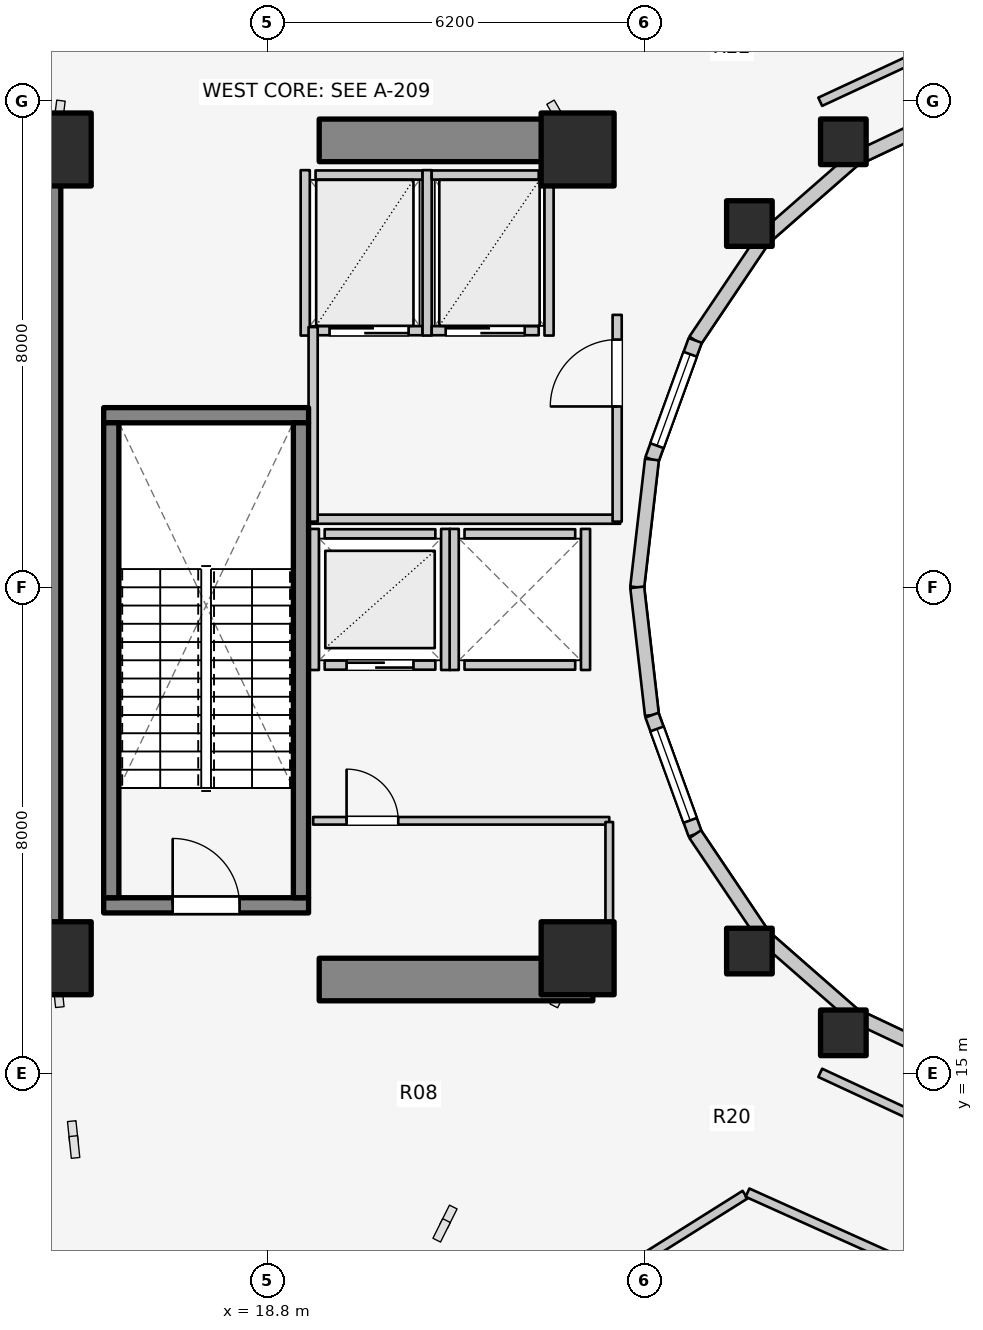
"""IFC4 building model, lengths in metres.
Left out: names, types, materials, properties, quantities, classifications, styles, units other than length and angle.
Written with IfcOpenShell. Run it as: python <this file> out.ifc"""

import sys

from ifc_helpers import new_model, si_unit, direction, frame, frame_2d, origin, origin_2d, place, context, subcontext, project, spatial, rectangle, extrude, element, fill, save


model = new_model("IFC4")
c1 = context("Model", 3, precision=1e-05, world=origin(), true_north=direction((0.0, 1.0)))
c2 = subcontext(c1, "Body", "Model", "MODEL_VIEW")
j1 = project(units=[si_unit("LENGTHUNIT", "METRE"), si_unit("PLANEANGLEUNIT", "RADIAN")], contexts=[c1])
p1 = place(None, origin())
s1 = spatial("IfcSite", under=j1, at=p1, CompositionType="ELEMENT")
p2 = place(p1, origin())
s2 = spatial("IfcBuilding", under=s1, at=p2, CompositionType="ELEMENT")
p3 = place(p2, frame((0.0, 0.0, 129.0)))
s3 = spatial("IfcBuildingStorey", under=s2, at=p3, CompositionType="ELEMENT", Elevation=129.0)
p4 = place(p3, frame((15.05, 17.05, 0.0), z_axis=(0.0, 0.0, 1.0), x_axis=(0.0, 1.0, 0.0)))
e1 = element("IfcWall", 1, at=p4, inside=s3, PredefinedType="SHEAR", context=c2, shape_type="SweptSolid", body=[
    extrude(rectangle(XDim=12.8, YDim=0.7, at=frame_2d((6.4, 0.0))), origin(), (0.0, 0.0, 1.0), 4.2),
])
for number, where, z_axis, x_axis in (
    (2, (19.65, 16.55, 0.0), (0.0, 0.0, 1.0), (1.0, 0.0, 0.0)),
    (3, (19.65, 30.35, 0.0), (0.0, 0.0, 1.0), (1.0, 0.0, 0.0)),
):
    element("IfcWall", number, at=place(p3, frame(where, z_axis=z_axis, x_axis=x_axis)), inside=s3, PredefinedType="SHEAR", context=c2, shape_type="SweptSolid", body=[
        extrude(rectangle(XDim=4.5, YDim=0.7, at=frame_2d((2.25, 0.0))), origin(), (0.0, 0.0, 1.0), 4.2),
    ])
p5 = place(p3, frame((16.105, 17.77, 0.0), z_axis=(0.0, 0.0, 1.0), x_axis=(1.0, 0.0, 0.0)))
e4 = element("IfcWall", 4, at=p5, inside=s3, PredefinedType="SOLIDWALL", context=c2, shape_type="SweptSolid", body=[
    extrude(rectangle(XDim=3.37, YDim=0.25, at=frame_2d((1.685, 0.0))), origin(), (0.0, 0.0, 1.0), 4.2),
])
p6 = place(p5, frame((1.135, 0.0, 0.0)))
e5 = element("IfcOpeningElement", 5, at=p6, cuts=e4, PredefinedType="OPENING", context=c2, shape_type="SweptSolid", body=[
    extrude(rectangle(XDim=1.1, YDim=2.1, at=frame_2d((0.55, 1.05))), frame((0.0, 0.135, 0.0), z_axis=(0.0, -1.0, 0.0), x_axis=(1.0, 0.0, 0.0)), (0.0, 0.0, 1.0), 0.27),
])
p7 = place(p3, frame((16.105, 25.83, 0.0), z_axis=(0.0, 0.0, 1.0), x_axis=(1.0, 0.0, 0.0)))
e6 = element("IfcWall", 6, at=p7, inside=s3, PredefinedType="SOLIDWALL", context=c2, shape_type="SweptSolid", body=[
    extrude(rectangle(XDim=3.37, YDim=0.25, at=frame_2d((1.685, 0.0))), origin(), (0.0, 0.0, 1.0), 4.2),
])
for number, where, z_axis, x_axis in (
    (7, (16.23, 17.895, 0.0), (0.0, 0.0, 1.0), (0.0, 1.0, 0.0)),
    (8, (19.35, 17.895, 0.0), (0.0, 0.0, 1.0), (0.0, 1.0, 0.0)),
):
    element("IfcWall", number, at=place(p3, frame(where, z_axis=z_axis, x_axis=x_axis)), inside=s3, PredefinedType="SOLIDWALL", context=c2, shape_type="SweptSolid", body=[
        extrude(rectangle(XDim=7.81, YDim=0.25, at=frame_2d((3.905, 0.0))), origin(), (0.0, 0.0, 1.0), 4.2),
    ])
for number, where, z_axis, x_axis in (
    (9, (15.3, 16.9, 0.0), (0.0, 0.0, 1.0), (1.0, 0.0, 0.0)),
    (10, (23.9, 16.9, 0.0), (0.0, 0.0, 1.0), (1.0, 0.0, 0.0)),
    (11, (23.9, 30.2, 0.0), (0.0, 0.0, 1.0), (1.0, 0.0, 0.0)),
    (12, (15.3, 30.2, 0.0), (0.0, 0.0, 1.0), (1.0, 0.0, 0.0)),
):
    element("IfcColumn", number, at=place(p3, frame(where, z_axis=z_axis, x_axis=x_axis)), inside=s3, PredefinedType="COLUMN", context=c2, shape_type="SweptSolid", body=[
        extrude(rectangle(XDim=1.2, YDim=1.2, at=origin_2d()), origin(), (0.0, 0.0, 1.0), 4.2),
    ])
for number, where, z_axis, x_axis in (
    (13, (28.27, 30.327, 0.0), (0.0, 0.0, 1.0), (1.0, 0.0, 0.0)),
    (14, (26.725, 28.982, 0.0), (0.0, 0.0, 1.0), (1.0, 0.0, 0.0)),
    (15, (26.725, 17.018, 0.0), (0.0, 0.0, 1.0), (1.0, 0.0, 0.0)),
    (16, (28.27, 15.673, 0.0), (0.0, 0.0, 1.0), (1.0, 0.0, 0.0)),
):
    element("IfcColumn", number, at=place(p3, frame(where, z_axis=z_axis, x_axis=x_axis)), inside=s3, PredefinedType="COLUMN", context=c2, shape_type="SweptSolid", body=[
        extrude(rectangle(XDim=0.75, YDim=0.75, at=origin_2d()), origin(), (0.0, 0.0, 1.0), 4.2),
    ])
p8 = place(p3, frame((30.157, 30.843, 0.0), z_axis=(0.0, 0.0, 1.0), x_axis=(-0.904179699603, -0.427152280606, 0.0)))
e17 = element("IfcWall", 17, at=p8, inside=s3, PredefinedType="STANDARD", context=c2, shape_type="SweptSolid", body=[
    extrude(rectangle(XDim=1.899, YDim=0.23, at=frame_2d((0.95, 0.0))), origin(), (0.0, 0.0, 1.0), 2.32),
])
p9 = place(p3, frame((28.44, 30.032, 0.0), z_axis=(0.0, 0.0, 1.0), x_axis=(-0.752576694707, -0.658504607869, 0.0)))
e18 = element("IfcWall", 18, at=p9, inside=s3, PredefinedType="STANDARD", context=c2, shape_type="SweptSolid", body=[
    extrude(rectangle(XDim=1.959, YDim=0.23, at=frame_2d((0.98, 0.0))), origin(), (0.0, 0.0, 1.0), 2.32),
])
p10 = place(p3, frame((26.965, 28.742, 0.0), z_axis=(0.0, 0.0, 1.0), x_axis=(-0.558197800898, -0.829707909492, 0.0)))
e19 = element("IfcWall", 19, at=p10, inside=s3, PredefinedType="STANDARD", context=c2, shape_type="SweptSolid", body=[
    extrude(rectangle(XDim=2.027, YDim=0.23, at=frame_2d((1.013, 0.0))), origin(), (0.0, 0.0, 1.0), 2.32),
])
p11 = place(p3, frame((25.834, 27.06, 0.0), z_axis=(0.0, 0.0, 1.0), x_axis=(-0.341423187295, -0.93990968033, 0.0)))
e20 = element("IfcWall", 20, at=p11, inside=s3, PredefinedType="STANDARD", context=c2, shape_type="SweptSolid", body=[
    extrude(rectangle(XDim=2.084, YDim=0.23, at=frame_2d((1.042, 0.0))), origin(), (0.0, 0.0, 1.0), 2.8),
])
p12 = place(p11, frame((0.242, 0.0, 0.85)))
e21 = element("IfcOpeningElement", 21, at=p12, cuts=e20, PredefinedType="OPENING", context=c2, shape_type="SweptSolid", body=[
    extrude(rectangle(XDim=1.6, YDim=1.65, at=frame_2d((0.8, 0.825))), frame((0.0, 0.125, 0.0), z_axis=(0.0, -1.0, 0.0), x_axis=(1.0, 0.0, 0.0)), (0.0, 0.0, 1.0), 0.25),
])
for number, where, z_axis, x_axis in (
    (22, (25.123, 25.102, 0.0), (0.0, 0.0, 1.0), (-0.115, -0.993, 0.0)),
    (23, (24.88, 23.0, 0.0), (0.0, 0.0, 1.0), (0.115, -0.993, 0.0)),
):
    element("IfcWall", number, at=place(p3, frame(where, z_axis=z_axis, x_axis=x_axis)), inside=s3, PredefinedType="STANDARD", context=c2, shape_type="SweptSolid", body=[
        extrude(rectangle(XDim=2.115, YDim=0.23, at=frame_2d((1.058, 0.0))), origin(), (0.0, 0.0, 1.0), 2.8),
    ])
p13 = place(p3, frame((25.123, 20.898, 0.0), z_axis=(0.0, 0.0, 1.0), x_axis=(0.341423187295, -0.93990968033, 0.0)))
e24 = element("IfcWall", 24, at=p13, inside=s3, PredefinedType="STANDARD", context=c2, shape_type="SweptSolid", body=[
    extrude(rectangle(XDim=2.084, YDim=0.23, at=frame_2d((1.042, 0.0))), origin(), (0.0, 0.0, 1.0), 2.8),
])
p14 = place(p13, frame((0.242, 0.0, 0.85)))
e25 = element("IfcOpeningElement", 25, at=p14, cuts=e24, PredefinedType="OPENING", context=c2, shape_type="SweptSolid", body=[
    extrude(rectangle(XDim=1.6, YDim=1.65, at=frame_2d((0.8, 0.825))), frame((0.0, 0.125, 0.0), z_axis=(0.0, -1.0, 0.0), x_axis=(1.0, 0.0, 0.0)), (0.0, 0.0, 1.0), 0.25),
])
p15 = place(p3, frame((25.834, 18.94, 0.0), z_axis=(0.0, 0.0, 1.0), x_axis=(0.558197800898, -0.829707909492, 0.0)))
e26 = element("IfcWall", 26, at=p15, inside=s3, PredefinedType="STANDARD", context=c2, shape_type="SweptSolid", body=[
    extrude(rectangle(XDim=2.027, YDim=0.23, at=frame_2d((1.013, 0.0))), origin(), (0.0, 0.0, 1.0), 2.32),
])
p16 = place(p3, frame((26.965, 17.258, 0.0), z_axis=(0.0, 0.0, 1.0), x_axis=(0.752576694707, -0.658504607869, 0.0)))
e27 = element("IfcWall", 27, at=p16, inside=s3, PredefinedType="STANDARD", context=c2, shape_type="SweptSolid", body=[
    extrude(rectangle(XDim=1.959, YDim=0.23, at=frame_2d((0.98, 0.0))), origin(), (0.0, 0.0, 1.0), 2.32),
])
p17 = place(p3, frame((28.44, 15.968, 0.0), z_axis=(0.0, 0.0, 1.0), x_axis=(0.904179699603, -0.427152280606, 0.0)))
e28 = element("IfcWall", 28, at=p17, inside=s3, PredefinedType="STANDARD", context=c2, shape_type="SweptSolid", body=[
    extrude(rectangle(XDim=1.899, YDim=0.23, at=frame_2d((0.95, 0.0))), origin(), (0.0, 0.0, 1.0), 2.32),
])
p18 = place(p3, frame((11.967, 13.432, 0.0), z_axis=(0.0, 0.0, 1.0), x_axis=(0.776963479771, -0.629545670387, 0.0)))
e29 = element("IfcWall", 29, at=p18, inside=s3, PredefinedType="STANDARD", context=c2, shape_type="SweptSolid", body=[
    extrude(rectangle(XDim=4.568, YDim=0.26, at=frame_2d((2.284, 0.0))), origin(), (0.0, 0.0, 1.0), 2.32),
])
p19 = place(p3, frame((19.74, 21.72, 0.0), z_axis=(0.0, 0.0, 1.0), x_axis=(1.0, 0.0, 0.0)))
e30 = element("IfcWall", 30, at=p19, inside=s3, PredefinedType="SOLIDWALL", context=c2, shape_type="SweptSolid", body=[
    extrude(rectangle(XDim=1.82, YDim=0.15, at=frame_2d((0.91, 0.0))), origin(), (0.0, 0.0, 1.0), 3.675),
])
p20 = place(p19, frame((0.36, 0.0, 0.0)))
e31 = element("IfcOpeningElement", 31, at=p20, cuts=e30, PredefinedType="OPENING", context=c2, shape_type="SweptSolid", body=[
    extrude(rectangle(XDim=1.1, YDim=2.1, at=frame_2d((0.55, 1.05))), frame((0.0, 0.085, 0.0), z_axis=(0.0, -1.0, 0.0), x_axis=(1.0, 0.0, 0.0)), (0.0, 0.0, 1.0), 0.17),
])
p21 = place(p3, frame((19.74, 23.88, 0.0), z_axis=(0.0, 0.0, 1.0), x_axis=(1.0, 0.0, 0.0)))
e32 = element("IfcWall", 32, at=p21, inside=s3, PredefinedType="SOLIDWALL", context=c2, shape_type="SweptSolid", body=[
    extrude(rectangle(XDim=1.82, YDim=0.15, at=frame_2d((0.91, 0.0))), origin(), (0.0, 0.0, 1.0), 3.675),
])
for number, where, z_axis, x_axis in (
    (33, (19.57, 21.64, 0.0), (0.0, 0.0, 1.0), (0.0, 1.0, 0.0)),
    (34, (21.73, 21.64, 0.0), (0.0, 0.0, 1.0), (0.0, 1.0, 0.0)),
):
    element("IfcWall", number, at=place(p3, frame(where, z_axis=z_axis, x_axis=x_axis)), inside=s3, PredefinedType="SOLIDWALL", context=c2, shape_type="SweptSolid", body=[
        extrude(rectangle(XDim=2.32, YDim=0.15, at=frame_2d((1.16, 0.0))), origin(), (0.0, 0.0, 1.0), 3.675),
    ])
for number, where, z_axis, x_axis in (
    (35, (22.04, 21.72, 0.0), (0.0, 0.0, 1.0), (1.0, 0.0, 0.0)),
    (36, (22.04, 23.88, 0.0), (0.0, 0.0, 1.0), (1.0, 0.0, 0.0)),
):
    element("IfcWall", number, at=place(p3, frame(where, z_axis=z_axis, x_axis=x_axis)), inside=s3, PredefinedType="SOLIDWALL", context=c2, shape_type="SweptSolid", body=[
        extrude(rectangle(XDim=1.82, YDim=0.15, at=frame_2d((0.91, 0.0))), origin(), (0.0, 0.0, 1.0), 3.22),
    ])
p22 = place(p3, frame((21.87, 21.64, 0.0), z_axis=(0.0, 0.0, 1.0), x_axis=(0.0, 1.0, 0.0)))
e37 = element("IfcWall", 37, at=p22, inside=s3, PredefinedType="SOLIDWALL", context=c2, shape_type="SweptSolid", body=[
    extrude(rectangle(XDim=2.32, YDim=0.15, at=frame_2d((1.16, 0.0))), origin(), (0.0, 0.0, 1.0), 3.675),
])
p23 = place(p3, frame((24.03, 21.64, 0.0), z_axis=(0.0, 0.0, 1.0), x_axis=(0.0, 1.0, 0.0)))
e38 = element("IfcWall", 38, at=p23, inside=s3, PredefinedType="SOLIDWALL", context=c2, shape_type="SweptSolid", body=[
    extrude(rectangle(XDim=2.32, YDim=0.15, at=frame_2d((1.16, 0.0))), origin(), (0.0, 0.0, 1.0), 3.22),
])
p24 = place(p3, frame((19.59, 27.22, 0.0), z_axis=(0.0, 0.0, 1.0), x_axis=(1.0, 0.0, 0.0)))
e39 = element("IfcWall", 39, at=p24, inside=s3, PredefinedType="SOLIDWALL", context=c2, shape_type="SweptSolid", body=[
    extrude(rectangle(XDim=1.76, YDim=0.15, at=frame_2d((0.88, 0.0))), origin(), (0.0, 0.0, 1.0), 3.675),
])
p25 = place(p24, frame((0.23, 0.0, 0.0)))
e40 = element("IfcOpeningElement", 40, at=p25, cuts=e39, PredefinedType="OPENING", context=c2, shape_type="SweptSolid", body=[
    extrude(rectangle(XDim=1.3, YDim=2.1, at=frame_2d((0.65, 1.05))), frame((0.0, 0.085, 0.0), z_axis=(0.0, -1.0, 0.0), x_axis=(1.0, 0.0, 0.0)), (0.0, 0.0, 1.0), 0.17),
])
p26 = place(p3, frame((19.59, 29.78, 0.0), z_axis=(0.0, 0.0, 1.0), x_axis=(1.0, 0.0, 0.0)))
e41 = element("IfcWall", 41, at=p26, inside=s3, PredefinedType="SOLIDWALL", context=c2, shape_type="SweptSolid", body=[
    extrude(rectangle(XDim=1.76, YDim=0.15, at=frame_2d((0.88, 0.0))), origin(), (0.0, 0.0, 1.0), 3.675),
])
for number, where, z_axis, x_axis in (
    (42, (19.42, 27.14, 0.0), (0.0, 0.0, 1.0), (0.0, 1.0, 0.0)),
    (43, (21.425, 27.14, 0.0), (0.0, 0.0, 1.0), (0.0, 1.0, 0.0)),
):
    element("IfcWall", number, at=place(p3, frame(where, z_axis=z_axis, x_axis=x_axis)), inside=s3, PredefinedType="SOLIDWALL", context=c2, shape_type="SweptSolid", body=[
        extrude(rectangle(XDim=2.72, YDim=0.15, at=frame_2d((1.36, 0.0))), origin(), (0.0, 0.0, 1.0), 3.675),
    ])
p27 = place(p3, frame((21.5, 27.22, 0.0), z_axis=(0.0, 0.0, 1.0), x_axis=(1.0, 0.0, 0.0)))
e44 = element("IfcWall", 44, at=p27, inside=s3, PredefinedType="SOLIDWALL", context=c2, shape_type="SweptSolid", body=[
    extrude(rectangle(XDim=1.76, YDim=0.15, at=frame_2d((0.88, 0.0))), origin(), (0.0, 0.0, 1.0), 3.675),
])
p28 = place(p27, frame((0.23, 0.0, 0.0)))
e45 = element("IfcOpeningElement", 45, at=p28, cuts=e44, PredefinedType="OPENING", context=c2, shape_type="SweptSolid", body=[
    extrude(rectangle(XDim=1.3, YDim=2.1, at=frame_2d((0.65, 1.05))), frame((0.0, 0.085, 0.0), z_axis=(0.0, -1.0, 0.0), x_axis=(1.0, 0.0, 0.0)), (0.0, 0.0, 1.0), 0.17),
])
p29 = place(p3, frame((21.5, 29.78, 0.0), z_axis=(0.0, 0.0, 1.0), x_axis=(1.0, 0.0, 0.0)))
e46 = element("IfcWall", 46, at=p29, inside=s3, PredefinedType="SOLIDWALL", context=c2, shape_type="SweptSolid", body=[
    extrude(rectangle(XDim=1.76, YDim=0.15, at=frame_2d((0.88, 0.0))), origin(), (0.0, 0.0, 1.0), 3.675),
])
p30 = place(p3, frame((23.43, 27.14, 0.0), z_axis=(0.0, 0.0, 1.0), x_axis=(0.0, 1.0, 0.0)))
e47 = element("IfcWall", 47, at=p30, inside=s3, PredefinedType="SOLIDWALL", context=c2, shape_type="SweptSolid", body=[
    extrude(rectangle(XDim=2.72, YDim=0.15, at=frame_2d((1.36, 0.0))), origin(), (0.0, 0.0, 1.0), 3.675),
])
p31 = place(p3, frame((19.52, 24.12, 0.0), z_axis=(0.0, 0.0, 1.0), x_axis=(1.0, 0.0, 0.0)))
e48 = element("IfcWall", 48, at=p31, inside=s3, PredefinedType="PARTITIONING", context=c2, shape_type="SweptSolid", body=[
    extrude(rectangle(XDim=5.08, YDim=0.15, at=frame_2d((2.54, 0.0))), origin(), (0.0, 0.0, 1.0), 3.22),
])
p32 = place(p3, frame((19.55, 24.08, 0.0), z_axis=(0.0, 0.0, 1.0), x_axis=(0.0, 1.0, 0.0)))
e49 = element("IfcWall", 49, at=p32, inside=s3, PredefinedType="PARTITIONING", context=c2, shape_type="SweptSolid", body=[
    extrude(rectangle(XDim=3.2, YDim=0.15, at=frame_2d((1.6, 0.0))), origin(), (0.0, 0.0, 1.0), 3.675),
])
p33 = place(p3, frame((24.55, 24.08, 0.0), z_axis=(0.0, 0.0, 1.0), x_axis=(0.0, 1.0, 0.0)))
e50 = element("IfcWall", 50, at=p33, inside=s3, PredefinedType="PARTITIONING", context=c2, shape_type="SweptSolid", body=[
    extrude(rectangle(XDim=3.4, YDim=0.15, at=frame_2d((1.7, 0.0))), origin(), (0.0, 0.0, 1.0), 3.675),
])
p34 = place(p33, frame((1.894, 0.0, 0.0)))
e51 = element("IfcOpeningElement", 51, at=p34, cuts=e50, PredefinedType="OPENING", context=c2, shape_type="SweptSolid", body=[
    extrude(rectangle(XDim=1.1, YDim=2.1, at=frame_2d((0.55, 1.05))), frame((0.0, 0.085, 0.0), z_axis=(0.0, -1.0, 0.0), x_axis=(1.0, 0.0, 0.0)), (0.0, 0.0, 1.0), 0.17),
])
p35 = place(p3, frame((19.55, 19.16, 0.0), z_axis=(0.0, 0.0, 1.0), x_axis=(1.0, 0.0, 0.0)))
e52 = element("IfcWall", 52, at=p35, inside=s3, PredefinedType="PARTITIONING", context=c2, shape_type="SweptSolid", body=[
    extrude(rectangle(XDim=4.87, YDim=0.125, at=frame_2d((2.435, 0.0))), origin(), (0.0, 0.0, 1.0), 3.22),
])
p36 = place(p35, frame((0.55, 0.0, 0.0)))
e53 = element("IfcOpeningElement", 53, at=p36, cuts=e52, PredefinedType="OPENING", context=c2, shape_type="SweptSolid", body=[
    extrude(rectangle(XDim=0.85, YDim=2.05, at=frame_2d((0.425, 1.025))), frame((0.0, 0.073, 0.0), z_axis=(0.0, -1.0, 0.0), x_axis=(1.0, 0.0, 0.0)), (0.0, 0.0, 1.0), 0.145),
])
p37 = place(p3, frame((24.42, 17.1, 0.0), z_axis=(0.0, 0.0, 1.0), x_axis=(0.0, 1.0, 0.0)))
e54 = element("IfcWall", 54, at=p37, inside=s3, PredefinedType="PARTITIONING", context=c2, shape_type="SweptSolid", body=[
    extrude(rectangle(XDim=2.04, YDim=0.125, at=frame_2d((1.02, 0.0))), origin(), (0.0, 0.0, 1.0), 3.052),
])
for number, where, z_axis, x_axis in (
    (55, (29.873, 31.906, 0.0), (0.0, 0.0, 1.0), (-0.907, -0.421, 0.0)),
    (56, (27.89, 15.015, 0.0), (0.0, 0.0, 1.0), (0.907, -0.421, 0.0)),
):
    element("IfcWall", number, at=place(p3, frame(where, z_axis=z_axis, x_axis=x_axis)), inside=s3, PredefinedType="PARTITIONING", context=c2, shape_type="SweptSolid", body=[
        extrude(rectangle(XDim=2.186, YDim=0.15, at=frame_2d((1.093, 0.0))), origin(), (0.0, 0.0, 1.0), 2.32),
    ])
p38 = place(p3, frame((26.653, 13.011, 0.0), z_axis=(0.0, 0.0, 1.0), x_axis=(-0.846958426242, -0.531659124081, 0.0)))
e57 = element("IfcWall", 57, at=p38, inside=s3, PredefinedType="PARTITIONING", context=c2, shape_type="SweptSolid", body=[
    extrude(rectangle(XDim=8.032, YDim=0.15, at=frame_2d((4.016, 0.0))), origin(), (0.0, 0.0, 1.0), 2.32),
])
p39 = place(p3, frame((26.694, 13.045, 0.0), z_axis=(0.0, 0.0, 1.0), x_axis=(0.912027064907, -0.410130019478, 0.0)))
e58 = element("IfcWall", 58, at=p39, inside=s3, PredefinedType="PARTITIONING", context=c2, shape_type="SweptSolid", body=[
    extrude(rectangle(XDim=2.812, YDim=0.15, at=frame_2d((1.406, 0.0))), origin(), (0.0, 0.0, 1.0), 3.119),
])
p40 = place(p12, origin())
e59 = element("IfcWindow", 59, at=p40, inside=s3, PartitioningType="SINGLE_PANEL", PredefinedType="WINDOW", context=c2, shape_type="SweptSolid", body=[
    extrude(rectangle(XDim=1.6, YDim=1.65, at=frame_2d((0.8, 0.825))), frame((0.0, 0.03, 0.0), z_axis=(0.0, -1.0, 0.0), x_axis=(1.0, 0.0, 0.0)), (0.0, 0.0, 1.0), 0.06),
])
fill(e21, e59)
p41 = place(p14, origin())
e60 = element("IfcWindow", 60, at=p41, inside=s3, PartitioningType="SINGLE_PANEL", PredefinedType="WINDOW", context=c2, shape_type="SweptSolid", body=[
    extrude(rectangle(XDim=1.6, YDim=1.65, at=frame_2d((0.8, 0.825))), frame((0.0, 0.03, 0.0), z_axis=(0.0, -1.0, 0.0), x_axis=(1.0, 0.0, 0.0)), (0.0, 0.0, 1.0), 0.06),
])
fill(e25, e60)
p42 = place(p6, origin())
e61 = element("IfcDoor", 61, at=p42, inside=s3, OperationType="SINGLE_SWING_LEFT", PredefinedType="DOOR", context=c2, shape_type="SweptSolid", body=[
    extrude(rectangle(XDim=1.1, YDim=2.1, at=frame_2d((0.55, 1.05))), frame((0.0, 0.025, 0.0), z_axis=(0.0, -1.0, 0.0), x_axis=(1.0, 0.0, 0.0)), (0.0, 0.0, 1.0), 0.05),
])
fill(e5, e61)
p43 = place(p20, origin())
e62 = element("IfcDoor", 62, at=p43, inside=s3, OperationType="DOUBLE_DOOR_SLIDING", PredefinedType="DOOR", context=c2, shape_type="SweptSolid", body=[
    extrude(rectangle(XDim=1.1, YDim=2.1, at=frame_2d((0.55, 1.05))), frame((0.0, 0.025, 0.0), z_axis=(0.0, -1.0, 0.0), x_axis=(1.0, 0.0, 0.0)), (0.0, 0.0, 1.0), 0.05),
])
fill(e31, e62)
p44 = place(p25, origin())
e63 = element("IfcDoor", 63, at=p44, inside=s3, OperationType="DOUBLE_DOOR_SLIDING", PredefinedType="DOOR", context=c2, shape_type="SweptSolid", body=[
    extrude(rectangle(XDim=1.3, YDim=2.1, at=frame_2d((0.65, 1.05))), frame((0.0, 0.025, 0.0), z_axis=(0.0, -1.0, 0.0), x_axis=(1.0, 0.0, 0.0)), (0.0, 0.0, 1.0), 0.05),
])
fill(e40, e63)
p45 = place(p28, origin())
e64 = element("IfcDoor", 64, at=p45, inside=s3, OperationType="DOUBLE_DOOR_SLIDING", PredefinedType="DOOR", context=c2, shape_type="SweptSolid", body=[
    extrude(rectangle(XDim=1.3, YDim=2.1, at=frame_2d((0.65, 1.05))), frame((0.0, 0.025, 0.0), z_axis=(0.0, -1.0, 0.0), x_axis=(1.0, 0.0, 0.0)), (0.0, 0.0, 1.0), 0.05),
])
fill(e45, e64)
p46 = place(p34, origin())
e65 = element("IfcDoor", 65, at=p46, inside=s3, OperationType="SINGLE_SWING_LEFT", PredefinedType="DOOR", context=c2, shape_type="SweptSolid", body=[
    extrude(rectangle(XDim=1.1, YDim=2.1, at=frame_2d((0.55, 1.05))), frame((0.0, 0.025, 0.0), z_axis=(0.0, -1.0, 0.0), x_axis=(1.0, 0.0, 0.0)), (0.0, 0.0, 1.0), 0.05),
])
fill(e51, e65)
p47 = place(p36, origin())
e66 = element("IfcDoor", 66, at=p47, inside=s3, OperationType="SINGLE_SWING_LEFT", PredefinedType="DOOR", context=c2, shape_type="SweptSolid", body=[
    extrude(rectangle(XDim=0.85, YDim=2.05, at=frame_2d((0.425, 1.025))), frame((0.0, 0.025, 0.0), z_axis=(0.0, -1.0, 0.0), x_axis=(1.0, 0.0, 0.0)), (0.0, 0.0, 1.0), 0.05),
])
fill(e53, e66)
save(model, sys.argv[1])
